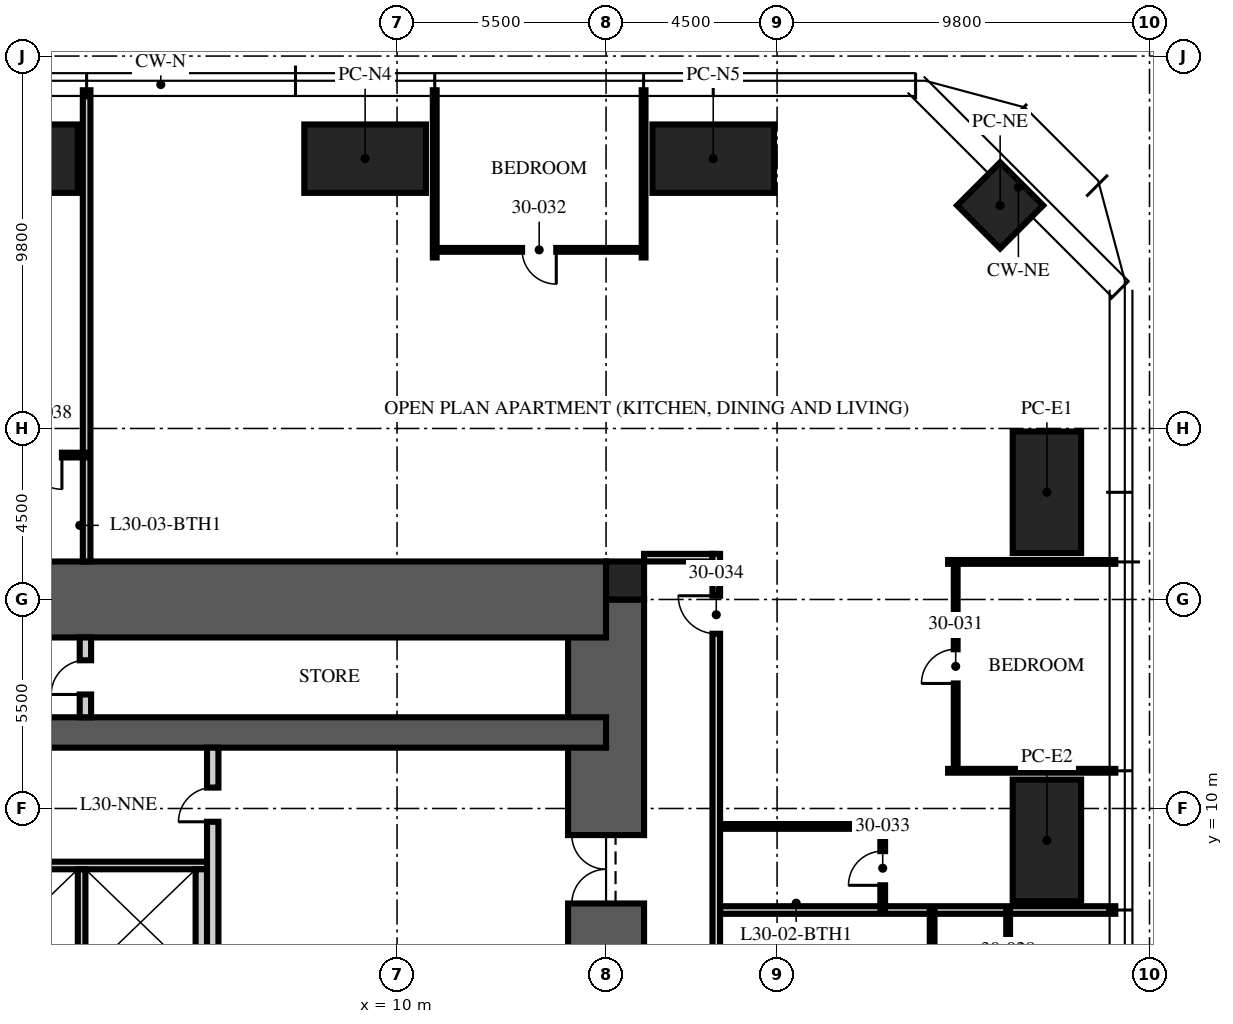
"""IFC4 building model, lengths in metres.
Left out: names, types, materials, properties, quantities, classifications, styles, units other than length and angle.
Written with IfcOpenShell. Run it as: python <this file> out.ifc"""

import sys

from ifc_helpers import new_model, si_unit, direction, frame, frame_2d, origin, origin_2d, place, context, subcontext, project, spatial, rectangle, extrude, element, fill, save


model = new_model("IFC4")
c1 = context("Model", 3, precision=1e-05, world=origin(), true_north=direction((0.0, 1.0)))
c2 = subcontext(c1, "Body", "Model", "MODEL_VIEW")
j1 = project(units=[si_unit("LENGTHUNIT", "METRE"), si_unit("PLANEANGLEUNIT", "RADIAN")], contexts=[c1])
p1 = place(None, origin())
s1 = spatial("IfcSite", under=j1, at=p1, CompositionType="ELEMENT")
p2 = place(p1, origin())
s2 = spatial("IfcBuilding", under=s1, at=p2, CompositionType="ELEMENT")
p3 = place(p2, frame((0.0, 0.0, 122.25)))
s3 = spatial("IfcBuildingStorey", under=s2, at=p3, CompositionType="ELEMENT", Elevation=122.25)
p4 = place(p3, frame((15.5, -15.5, -0.25), z_axis=(0.0, 0.0, 1.0), x_axis=(0.0, 1.0, 0.0)))
e1 = element("IfcWall", 1, at=p4, inside=s3, PredefinedType="SHEAR", context=c2, shape_type="SweptSolid", body=[
    extrude(rectangle(XDim=31.0, YDim=2.0, at=frame_2d((15.5, 0.0))), origin(), (0.0, 0.0, 1.0), 3.75),
])
p5 = place(p4, frame((6.5, 0.0, 0.25)))
e2 = element("IfcOpeningElement", 2, at=p5, cuts=e1, PredefinedType="OPENING", context=c2, shape_type="SweptSolid", body=[
    extrude(rectangle(XDim=1.2, YDim=2.1, at=frame_2d((0.6, 1.05))), frame((0.0, 1.01, 0.0), z_axis=(0.0, -1.0, 0.0), x_axis=(1.0, 0.0, 0.0)), (0.0, 0.0, 1.0), 2.02),
])
p6 = place(p4, frame((23.0, 0.0, 0.25)))
e3 = element("IfcOpeningElement", 3, at=p6, cuts=e1, PredefinedType="OPENING", context=c2, shape_type="SweptSolid", body=[
    extrude(rectangle(XDim=1.8, YDim=2.1, at=frame_2d((0.9, 1.05))), frame((0.0, 1.01, 0.0), z_axis=(0.0, -1.0, 0.0), x_axis=(1.0, 0.0, 0.0)), (0.0, 0.0, 1.0), 2.02),
])
p7 = place(p3, frame((-15.5, 15.5, -0.25), z_axis=(0.0, 0.0, 1.0), x_axis=(1.0, 0.0, 0.0)))
e4 = element("IfcWall", 4, at=p7, inside=s3, PredefinedType="SHEAR", context=c2, shape_type="SweptSolid", body=[
    extrude(rectangle(XDim=31.0, YDim=2.0, at=frame_2d((15.5, 0.0))), origin(), (0.0, 0.0, 1.0), 3.75),
])
p8 = place(p7, frame((5.0, 0.0, 0.25)))
e5 = element("IfcOpeningElement", 5, at=p8, cuts=e4, PredefinedType="OPENING", context=c2, shape_type="SweptSolid", body=[
    extrude(rectangle(XDim=1.0, YDim=2.1, at=frame_2d((0.5, 1.05))), frame((0.0, 1.01, 0.0), z_axis=(0.0, -1.0, 0.0), x_axis=(1.0, 0.0, 0.0)), (0.0, 0.0, 1.0), 2.02),
])
p9 = place(p3, frame((-15.5, 12.0, -0.25), z_axis=(0.0, 0.0, 1.0), x_axis=(1.0, 0.0, 0.0)))
e6 = element("IfcWall", 6, at=p9, inside=s3, PredefinedType="SHEAR", context=c2, shape_type="SweptSolid", body=[
    extrude(rectangle(XDim=31.0, YDim=0.8, at=frame_2d((15.5, 0.0))), origin(), (0.0, 0.0, 1.0), 3.75),
])
p10 = place(p3, frame((16.0, 16.0, -0.25), z_axis=(0.0, 0.0, 1.0), x_axis=(1.0, 0.0, 0.0)))
e7 = element("IfcColumn", 7, at=p10, inside=s3, PredefinedType="COLUMN", context=c2, shape_type="SweptSolid", body=[
    extrude(rectangle(XDim=1.0, YDim=1.0, at=origin_2d()), origin(), (0.0, 0.0, 1.0), 3.75),
])
for number, where, z_axis, x_axis in (
    (8, (0.0, 27.1, 0.0), (0.0, 0.0, 1.0), (1.0, 0.0, 0.0)),
    (9, (9.16, 27.1, 0.0), (0.0, 0.0, 1.0), (1.0, 0.0, 0.0)),
    (10, (18.32, 27.1, 0.0), (0.0, 0.0, 1.0), (1.0, 0.0, 0.0)),
    (11, (27.1, 18.32, 0.0), (0.0, 0.0, 1.0), (0.0, 1.0, 0.0)),
    (12, (27.1, 9.16, 0.0), (0.0, 0.0, 1.0), (0.0, 1.0, 0.0)),
):
    element("IfcColumn", number, at=place(p3, frame(where, z_axis=z_axis, x_axis=x_axis)), inside=s3, PredefinedType="COLUMN", context=c2, shape_type="SweptSolid", body=[
        extrude(rectangle(XDim=3.2, YDim=1.8, at=origin_2d()), origin(), (0.0, 0.0, 1.0), 3.75),
    ])
p11 = place(p3, frame((25.87, 25.87, 0.0), z_axis=(0.0, 0.0, 1.0), x_axis=(0.707106781187, -0.707106781187, 0.0)))
e13 = element("IfcColumn", 13, at=p11, inside=s3, PredefinedType="COLUMN", context=c2, shape_type="SweptSolid", body=[
    extrude(rectangle(XDim=1.6, YDim=1.6, at=origin_2d()), origin(), (0.0, 0.0, 1.0), 3.75),
])
p12 = place(p3, frame((-4.7, 8.5, 0.0), z_axis=(0.0, 0.0, 1.0), x_axis=(1.0, 0.0, 0.0)))
e14 = element("IfcWall", 14, at=p12, inside=s3, PredefinedType="PARTITIONING", context=c2, shape_type="SweptSolid", body=[
    extrude(rectangle(XDim=9.7, YDim=0.2, at=frame_2d((4.85, 0.0))), origin(), (0.0, 0.0, 1.0), 3.5),
])
p13 = place(p3, frame((4.85, 5.6, 0.0), z_axis=(0.0, 0.0, 1.0), x_axis=(0.0, 1.0, 0.0)))
e15 = element("IfcWall", 15, at=p13, inside=s3, PredefinedType="PARTITIONING", context=c2, shape_type="SweptSolid", body=[
    extrude(rectangle(XDim=2.8, YDim=0.3, at=frame_2d((1.4, 0.0))), origin(), (0.0, 0.0, 1.0), 3.5),
])
p14 = place(p3, frame((1.7, 5.6, 0.0), z_axis=(0.0, 0.0, 1.0), x_axis=(0.0, 1.0, 0.0)))
e16 = element("IfcWall", 16, at=p14, inside=s3, PredefinedType="PARTITIONING", context=c2, shape_type="SweptSolid", body=[
    extrude(rectangle(XDim=2.8, YDim=0.2, at=frame_2d((1.4, 0.0))), origin(), (0.0, 0.0, 1.0), 3.5),
])
p15 = place(p3, frame((5.15, 5.3, 0.0), z_axis=(0.0, 0.0, 1.0), x_axis=(0.0, 1.0, 0.0)))
e17 = element("IfcWall", 17, at=p15, inside=s3, PredefinedType="PARTITIONING", context=c2, shape_type="SweptSolid", body=[
    extrude(rectangle(XDim=6.3, YDim=0.3, at=frame_2d((3.15, 0.0))), origin(), (0.0, 0.0, 1.0), 3.5),
])
p16 = place(p15, frame((4.35, 0.0, 0.0)))
e18 = element("IfcOpeningElement", 18, at=p16, cuts=e17, PredefinedType="OPENING", context=c2, shape_type="SweptSolid", body=[
    extrude(rectangle(XDim=0.9, YDim=2.1, at=frame_2d((0.45, 1.05))), frame((0.0, 0.16, 0.0), z_axis=(0.0, -1.0, 0.0), x_axis=(1.0, 0.0, 0.0)), (0.0, 0.0, 1.0), 0.32),
])
p17 = place(p3, frame((1.8, 12.4, 0.0), z_axis=(0.0, 0.0, 1.0), x_axis=(0.0, 1.0, 0.0)))
e19 = element("IfcWall", 19, at=p17, inside=s3, PredefinedType="PARTITIONING", context=c2, shape_type="SweptSolid", body=[
    extrude(rectangle(XDim=2.1, YDim=0.3, at=frame_2d((1.05, 0.0))), origin(), (0.0, 0.0, 1.0), 3.5),
])
p18 = place(p17, frame((0.6, 0.0, 0.0)))
e20 = element("IfcOpeningElement", 20, at=p18, cuts=e19, PredefinedType="OPENING", context=c2, shape_type="SweptSolid", body=[
    extrude(rectangle(XDim=0.9, YDim=2.1, at=frame_2d((0.45, 1.05))), frame((0.0, 0.16, 0.0), z_axis=(0.0, -1.0, 0.0), x_axis=(1.0, 0.0, 0.0)), (0.0, 0.0, 1.0), 0.32),
])
p19 = place(p3, frame((16.5, 16.6, 0.0), z_axis=(0.0, 0.0, 1.0), x_axis=(1.0, 0.0, 0.0)))
e21 = element("IfcWall", 21, at=p19, inside=s3, PredefinedType="PARTITIONING", context=c2, shape_type="SweptSolid", body=[
    extrude(rectangle(XDim=1.8, YDim=0.2, at=frame_2d((0.9, 0.0))), origin(), (0.0, 0.0, 1.0), 2.3),
])
p20 = place(p3, frame((18.5, 7.328, 0.0), z_axis=(0.0, 0.0, 1.0), x_axis=(1.0, 0.0, 0.0)))
e22 = element("IfcWall", 22, at=p20, inside=s3, PredefinedType="PARTITIONING", context=c2, shape_type="SweptSolid", body=[
    extrude(rectangle(XDim=10.4, YDim=0.2, at=frame_2d((5.2, 0.0))), origin(), (0.0, 0.0, 1.0), 2.81),
])
for number, where, z_axis, x_axis in (
    (23, (24.5, 10.992, 0.0), (0.0, 0.0, 1.0), (1.0, 0.0, 0.0)),
    (24, (24.5, 16.488, 0.0), (0.0, 0.0, 1.0), (1.0, 0.0, 0.0)),
    (25, (16.488, 24.5, 0.0), (0.0, 0.0, 1.0), (0.0, 1.0, 0.0)),
    (26, (10.992, 24.5, 0.0), (0.0, 0.0, 1.0), (0.0, 1.0, 0.0)),
):
    element("IfcWall", number, at=place(p3, frame(where, z_axis=z_axis, x_axis=x_axis)), inside=s3, PredefinedType="PARTITIONING", context=c2, shape_type="SweptSolid", body=[
        extrude(rectangle(XDim=4.4, YDim=0.1, at=frame_2d((2.2, 0.0))), origin(), (0.0, 0.0, 1.0), 2.81),
    ])
p21 = place(p3, frame((1.832, 16.5, 0.0), z_axis=(0.0, 0.0, 1.0), x_axis=(0.0, 1.0, 0.0)))
e27 = element("IfcWall", 27, at=p21, inside=s3, PredefinedType="PARTITIONING", context=c2, shape_type="SweptSolid", body=[
    extrude(rectangle(XDim=12.4, YDim=0.2, at=frame_2d((6.2, 0.0))), origin(), (0.0, 0.0, 1.0), 2.81),
])
p22 = place(p3, frame((26.08, 1.832, 0.0), z_axis=(0.0, 0.0, 1.0), x_axis=(0.0, 1.0, 0.0)))
e28 = element("IfcWall", 28, at=p22, inside=s3, PredefinedType="PARTITIONING", context=c2, shape_type="SweptSolid", body=[
    extrude(rectangle(XDim=5.496, YDim=0.1, at=frame_2d((2.748, 0.0))), origin(), (0.0, 0.0, 1.0), 2.81),
])
p23 = place(p22, frame((0.15, 0.0, 0.0)))
e29 = element("IfcOpeningElement", 29, at=p23, cuts=e28, PredefinedType="OPENING", context=c2, shape_type="SweptSolid", body=[
    extrude(rectangle(XDim=0.9, YDim=2.1, at=frame_2d((0.45, 1.05))), frame((0.0, 0.06, 0.0), z_axis=(0.0, -1.0, 0.0), x_axis=(1.0, 0.0, 0.0)), (0.0, 0.0, 1.0), 0.12),
])
p24 = place(p22, frame((2.898, 0.0, 0.0)))
e30 = element("IfcOpeningElement", 30, at=p24, cuts=e28, PredefinedType="OPENING", context=c2, shape_type="SweptSolid", body=[
    extrude(rectangle(XDim=0.9, YDim=2.1, at=frame_2d((0.45, 1.05))), frame((0.0, 0.06, 0.0), z_axis=(0.0, -1.0, 0.0), x_axis=(1.0, 0.0, 0.0)), (0.0, 0.0, 1.0), 0.12),
])
p25 = place(p3, frame((24.08, 3.032, 0.0), z_axis=(0.0, 0.0, 1.0), x_axis=(0.0, 1.0, 0.0)))
e31 = element("IfcWall", 31, at=p25, inside=s3, PredefinedType="PARTITIONING", context=c2, shape_type="SweptSolid", body=[
    extrude(rectangle(XDim=4.296, YDim=0.125, at=frame_2d((2.148, 0.0))), origin(), (0.0, 0.0, 1.0), 2.81),
])
p26 = place(p3, frame((24.7, 10.992, 0.0), z_axis=(0.0, 0.0, 1.0), x_axis=(0.0, 1.0, 0.0)))
e32 = element("IfcWall", 32, at=p26, inside=s3, PredefinedType="PARTITIONING", context=c2, shape_type="SweptSolid", body=[
    extrude(rectangle(XDim=5.496, YDim=0.1, at=frame_2d((2.748, 0.0))), origin(), (0.0, 0.0, 1.0), 2.81),
])
p27 = place(p26, frame((2.298, 0.0, 0.0)))
e33 = element("IfcOpeningElement", 33, at=p27, cuts=e32, PredefinedType="OPENING", context=c2, shape_type="SweptSolid", body=[
    extrude(rectangle(XDim=0.9, YDim=2.1, at=frame_2d((0.45, 1.05))), frame((0.0, 0.06, 0.0), z_axis=(0.0, -1.0, 0.0), x_axis=(1.0, 0.0, 0.0)), (0.0, 0.0, 1.0), 0.12),
])
p28 = place(p3, frame((16.488, 24.7, 0.0), z_axis=(0.0, 0.0, 1.0), x_axis=(-1.0, 0.0, 0.0)))
e34 = element("IfcWall", 34, at=p28, inside=s3, PredefinedType="PARTITIONING", context=c2, shape_type="SweptSolid", body=[
    extrude(rectangle(XDim=5.496, YDim=0.1, at=frame_2d((2.748, 0.0))), origin(), (0.0, 0.0, 1.0), 2.81),
])
p29 = place(p28, frame((2.298, 0.0, 0.0)))
e35 = element("IfcOpeningElement", 35, at=p29, cuts=e34, PredefinedType="OPENING", context=c2, shape_type="SweptSolid", body=[
    extrude(rectangle(XDim=0.9, YDim=2.1, at=frame_2d((0.45, 1.05))), frame((0.0, 0.06, 0.0), z_axis=(0.0, -1.0, 0.0), x_axis=(1.0, 0.0, 0.0)), (0.0, 0.0, 1.0), 0.12),
])
p30 = place(p3, frame((22.78, 7.328, 0.0), z_axis=(0.0, 0.0, 1.0), x_axis=(0.0, 1.0, 0.0)))
e36 = element("IfcWall", 36, at=p30, inside=s3, PredefinedType="PARTITIONING", context=c2, shape_type="SweptSolid", body=[
    extrude(rectangle(XDim=2.2, YDim=0.125, at=frame_2d((1.1, 0.0))), origin(), (0.0, 0.0, 1.0), 2.7),
])
p31 = place(p30, frame((0.65, 0.0, 0.0)))
e37 = element("IfcOpeningElement", 37, at=p31, cuts=e36, PredefinedType="OPENING", context=c2, shape_type="SweptSolid", body=[
    extrude(rectangle(XDim=0.9, YDim=2.1, at=frame_2d((0.45, 1.05))), frame((0.0, 0.073, 0.0), z_axis=(0.0, -1.0, 0.0), x_axis=(1.0, 0.0, 0.0)), (0.0, 0.0, 1.0), 0.145),
])
p32 = place(p3, frame((18.5, 9.528, 0.0), z_axis=(0.0, 0.0, 1.0), x_axis=(1.0, 0.0, 0.0)))
e38 = element("IfcWall", 38, at=p32, inside=s3, PredefinedType="PARTITIONING", context=c2, shape_type="SweptSolid", body=[
    extrude(rectangle(XDim=4.28, YDim=0.125, at=frame_2d((2.14, 0.0))), origin(), (0.0, 0.0, 1.0), 3.5),
])
p33 = place(p3, frame((1.832, 19.3, 0.0), z_axis=(0.0, 0.0, 1.0), x_axis=(-1.0, 0.0, 0.0)))
e39 = element("IfcWall", 39, at=p33, inside=s3, PredefinedType="PARTITIONING", context=c2, shape_type="SweptSolid", body=[
    extrude(rectangle(XDim=2.2, YDim=0.125, at=frame_2d((1.1, 0.0))), origin(), (0.0, 0.0, 1.0), 2.7),
])
p34 = place(p33, frame((0.65, 0.0, 0.0)))
e40 = element("IfcOpeningElement", 40, at=p34, cuts=e39, PredefinedType="OPENING", context=c2, shape_type="SweptSolid", body=[
    extrude(rectangle(XDim=0.9, YDim=2.1, at=frame_2d((0.45, 1.05))), frame((0.0, 0.073, 0.0), z_axis=(0.0, -1.0, 0.0), x_axis=(1.0, 0.0, 0.0)), (0.0, 0.0, 1.0), 0.145),
])
p35 = place(p3, frame((18.4, -5.328, 0.0), z_axis=(0.0, 0.0, 1.0), x_axis=(0.0, 1.0, 0.0)))
e41 = element("IfcWall", 41, at=p35, inside=s3, PredefinedType="PARTITIONING", context=c2, shape_type="SweptSolid", body=[
    extrude(rectangle(XDim=22.028, YDim=0.2, at=frame_2d((11.014, 0.0))), origin(), (0.0, 0.0, 1.0), 2.7),
])
p36 = place(p35, frame((19.926, 0.0, 0.0)))
e42 = element("IfcOpeningElement", 42, at=p36, cuts=e41, PredefinedType="OPENING", context=c2, shape_type="SweptSolid", body=[
    extrude(rectangle(XDim=1.0, YDim=2.2, at=frame_2d((0.5, 1.1))), frame((0.0, 0.11, 0.0), z_axis=(0.0, -1.0, 0.0), x_axis=(1.0, 0.0, 0.0)), (0.0, 0.0, 1.0), 0.22),
])
p37 = place(p6, origin())
e43 = element("IfcDoor", 43, at=p37, inside=s3, OperationType="DOUBLE_DOOR_SINGLE_SWING", PredefinedType="DOOR", context=c2, shape_type="SweptSolid", body=[
    extrude(rectangle(XDim=1.8, YDim=2.1, at=frame_2d((0.9, 1.05))), frame((0.0, 0.025, 0.0), z_axis=(0.0, -1.0, 0.0), x_axis=(1.0, 0.0, 0.0)), (0.0, 0.0, 1.0), 0.05),
])
fill(e3, e43)
p38 = place(p16, origin())
e44 = element("IfcDoor", 44, at=p38, inside=s3, OperationType="SINGLE_SWING_LEFT", PredefinedType="DOOR", context=c2, shape_type="SweptSolid", body=[
    extrude(rectangle(XDim=0.9, YDim=2.1, at=frame_2d((0.45, 1.05))), frame((0.0, 0.025, 0.0), z_axis=(0.0, -1.0, 0.0), x_axis=(1.0, 0.0, 0.0)), (0.0, 0.0, 1.0), 0.05),
])
fill(e18, e44)
p39 = place(p18, origin())
e45 = element("IfcDoor", 45, at=p39, inside=s3, OperationType="SINGLE_SWING_LEFT", PredefinedType="DOOR", context=c2, shape_type="SweptSolid", body=[
    extrude(rectangle(XDim=0.9, YDim=2.1, at=frame_2d((0.45, 1.05))), frame((0.0, 0.025, 0.0), z_axis=(0.0, -1.0, 0.0), x_axis=(1.0, 0.0, 0.0)), (0.0, 0.0, 1.0), 0.05),
])
fill(e20, e45)
p40 = place(p27, origin())
e46 = element("IfcDoor", 46, at=p40, inside=s3, OperationType="SINGLE_SWING_LEFT", PredefinedType="DOOR", context=c2, shape_type="SweptSolid", body=[
    extrude(rectangle(XDim=0.9, YDim=2.1, at=frame_2d((0.45, 1.05))), frame((0.0, 0.025, 0.0), z_axis=(0.0, -1.0, 0.0), x_axis=(1.0, 0.0, 0.0)), (0.0, 0.0, 1.0), 0.05),
])
fill(e33, e46)
p41 = place(p29, origin())
e47 = element("IfcDoor", 47, at=p41, inside=s3, OperationType="SINGLE_SWING_LEFT", PredefinedType="DOOR", context=c2, shape_type="SweptSolid", body=[
    extrude(rectangle(XDim=0.9, YDim=2.1, at=frame_2d((0.45, 1.05))), frame((0.0, 0.025, 0.0), z_axis=(0.0, -1.0, 0.0), x_axis=(1.0, 0.0, 0.0)), (0.0, 0.0, 1.0), 0.05),
])
fill(e35, e47)
p42 = place(p31, origin())
e48 = element("IfcDoor", 48, at=p42, inside=s3, OperationType="SINGLE_SWING_LEFT", PredefinedType="DOOR", context=c2, shape_type="SweptSolid", body=[
    extrude(rectangle(XDim=0.9, YDim=2.1, at=frame_2d((0.45, 1.05))), frame((0.0, 0.025, 0.0), z_axis=(0.0, -1.0, 0.0), x_axis=(1.0, 0.0, 0.0)), (0.0, 0.0, 1.0), 0.05),
])
fill(e37, e48)
p43 = place(p36, origin())
e49 = element("IfcDoor", 49, at=p43, inside=s3, OperationType="SINGLE_SWING_RIGHT", PredefinedType="DOOR", context=c2, shape_type="SweptSolid", body=[
    extrude(rectangle(XDim=1.0, YDim=2.2, at=frame_2d((0.5, 1.1))), frame((0.0, 0.025, 0.0), z_axis=(0.0, -1.0, 0.0), x_axis=(1.0, 0.0, 0.0)), (0.0, 0.0, 1.0), 0.05),
])
fill(e42, e49)
p44 = place(p34, origin())
e50 = element("IfcDoor", 50, at=p44, inside=s3, OperationType="SINGLE_SWING_LEFT", PredefinedType="DOOR", context=c2, shape_type="SweptSolid", body=[
    extrude(rectangle(XDim=0.9, YDim=2.1, at=frame_2d((0.45, 1.05))), frame((0.0, 0.025, 0.0), z_axis=(0.0, -1.0, 0.0), x_axis=(1.0, 0.0, 0.0)), (0.0, 0.0, 1.0), 0.05),
])
fill(e40, e50)
save(model, sys.argv[1])
